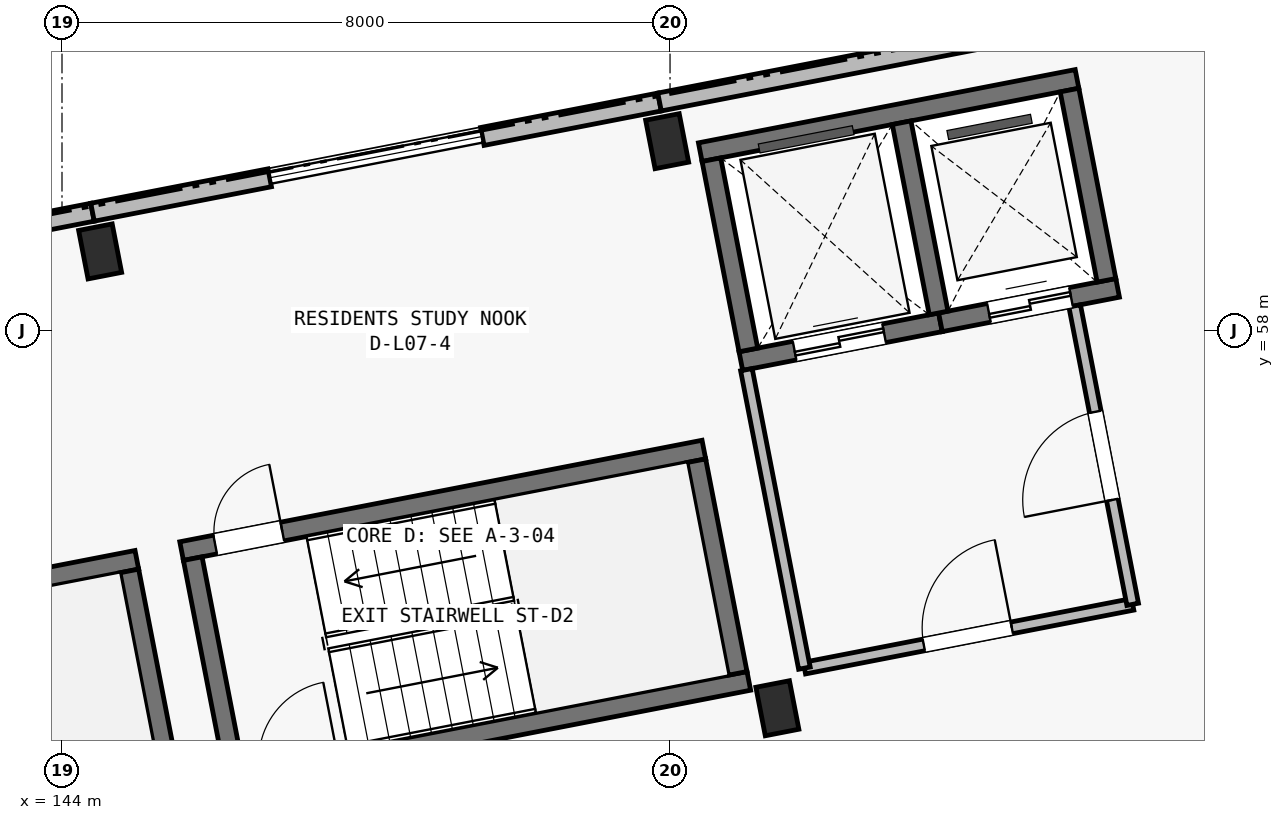
"""IFC4 building model, lengths in metres.
Left out: names, types, materials, properties, quantities, classifications, styles, units other than length and angle.
Written with IfcOpenShell. Run it as: python <this file> out.ifc"""

import sys

from ifc_helpers import new_model, si_unit, direction, frame, frame_2d, origin, origin_2d, place, context, subcontext, project, spatial, rectangle, extrude, element, fill, save


model = new_model("IFC4")
c1 = context("Model", 3, precision=1e-05, world=origin(), true_north=direction((0.0, 1.0)))
c2 = subcontext(c1, "Body", "Model", "MODEL_VIEW")
j1 = project(units=[si_unit("LENGTHUNIT", "METRE"), si_unit("PLANEANGLEUNIT", "RADIAN")], contexts=[c1])
p1 = place(None, origin())
s1 = spatial("IfcSite", under=j1, at=p1, CompositionType="ELEMENT")
p2 = place(p1, origin())
s2 = spatial("IfcBuilding", under=s1, at=p2, CompositionType="ELEMENT")
p3 = place(p2, frame((0.0, 0.0, 24.65)))
s3 = spatial("IfcBuildingStorey", under=s2, at=p3, CompositionType="ELEMENT", Elevation=24.65)
for number, where, z_axis, x_axis in (
    (1, (144.502, 59.041, 0.0), (0.0, 0.0, 1.0), (0.982, 0.191, 0.0)),
    (2, (153.412, 53.03, 0.0), (0.0, 0.0, 1.0), (0.982, 0.191, 0.0)),
    (3, (151.962, 60.491, 0.0), (0.0, 0.0, 1.0), (0.982, 0.191, 0.0)),
):
    element("IfcColumn", number, at=place(p3, frame(where, z_axis=z_axis, x_axis=x_axis)), inside=s3, PredefinedType="COLUMN", context=c2, shape_type="SweptSolid", body=[
        extrude(rectangle(XDim=0.45, YDim=0.65, at=origin_2d()), origin(), (0.0, 0.0, 1.0), 3.25),
    ])
p4 = place(p3, frame((152.397, 60.346, 0.0), z_axis=(0.0, 0.0, 1.0), x_axis=(0.981635261308, 0.190767433692, 0.0)))
e4 = element("IfcWall", 4, at=p4, inside=s3, PredefinedType="SHEAR", context=c2, shape_type="SweptSolid", body=[
    extrude(rectangle(XDim=5.05, YDim=0.25, at=frame_2d((2.525, 0.0))), origin(), (0.0, 0.0, 1.0), 3.25),
])
p5 = place(p3, frame((152.932, 57.598, 0.0), z_axis=(0.0, 0.0, 1.0), x_axis=(0.981636759622, 0.190759723627, 0.0)))
e5 = element("IfcWall", 5, at=p5, inside=s3, PredefinedType="SHEAR", context=c2, shape_type="SweptSolid", body=[
    extrude(rectangle(XDim=2.675, YDim=0.25, at=frame_2d((1.337, 0.0))), origin(), (0.0, 0.0, 1.0), 3.25),
])
p6 = place(p5, frame((0.72, 0.0, 0.0)))
e6 = element("IfcOpeningElement", 6, at=p6, cuts=e5, PredefinedType="OPENING", context=c2, shape_type="SweptSolid", body=[
    extrude(rectangle(XDim=1.2, YDim=2.2, at=frame_2d((0.6, 1.1))), frame((0.0, 0.14, 0.0), z_axis=(0.0, -1.0, 0.0), x_axis=(1.0, 0.0, 0.0)), (0.0, 0.0, 1.0), 0.28),
])
p7 = place(p3, frame((155.558, 58.108, 0.0), z_axis=(0.0, 0.0, 1.0), x_axis=(0.981633573872, 0.190776116556, 0.0)))
e7 = element("IfcWall", 7, at=p7, inside=s3, PredefinedType="SHEAR", context=c2, shape_type="SweptSolid", body=[
    extrude(rectangle(XDim=2.375, YDim=0.25, at=frame_2d((1.188, 0.0))), origin(), (0.0, 0.0, 1.0), 3.25),
])
p8 = place(p7, frame((0.65, 0.0, 0.0)))
e8 = element("IfcOpeningElement", 8, at=p8, cuts=e7, PredefinedType="OPENING", context=c2, shape_type="SweptSolid", body=[
    extrude(rectangle(XDim=1.1, YDim=2.15, at=frame_2d((0.55, 1.075))), frame((0.0, 0.14, 0.0), z_axis=(0.0, -1.0, 0.0), x_axis=(1.0, 0.0, 0.0)), (0.0, 0.0, 1.0), 0.28),
])
for number, where, z_axis, x_axis in (
    (9, (153.031, 57.744, 0.0), (0.0, 0.0, 1.0), (-0.191, 0.982, 0.0)),
    (10, (155.534, 58.231, 0.0), (0.0, 0.0, 1.0), (-0.191, 0.982, 0.0)),
    (11, (157.742, 58.66, 0.0), (0.0, 0.0, 1.0), (-0.191, 0.982, 0.0)),
):
    element("IfcWall", number, at=place(p3, frame(where, z_axis=z_axis, x_axis=x_axis)), inside=s3, PredefinedType="SHEAR", context=c2, shape_type="SweptSolid", body=[
        extrude(rectangle(XDim=2.55, YDim=0.25, at=frame_2d((1.275, 0.0))), origin(), (0.0, 0.0, 1.0), 3.25),
    ])
p9 = place(p3, frame((138.113, 53.647, 0.0), z_axis=(0.0, 0.0, 1.0), x_axis=(0.981626097708, 0.19081458094, 0.0)))
e12 = element("IfcWall", 12, at=p9, inside=s3, PredefinedType="SHEAR", context=c2, shape_type="SweptSolid", body=[
    extrude(rectangle(XDim=7.0, YDim=0.25, at=frame_2d((3.5, 0.0))), origin(), (0.0, 0.0, 1.0), 3.25),
])
p10 = place(p9, frame((0.45, 0.0, 0.0)))
e13 = element("IfcOpeningElement", 13, at=p10, cuts=e12, PredefinedType="OPENING", context=c2, shape_type="SweptSolid", body=[
    extrude(rectangle(XDim=0.9, YDim=2.1, at=frame_2d((0.45, 1.05))), frame((0.0, 0.14, 0.0), z_axis=(0.0, -1.0, 0.0), x_axis=(1.0, 0.0, 0.0)), (0.0, 0.0, 1.0), 0.28),
])
p11 = place(p3, frame((145.43, 52.039, 0.0), z_axis=(0.0, 0.0, 1.0), x_axis=(-0.190842147128, 0.981620738819, 0.0)))
e14 = element("IfcWall", 14, at=p11, inside=s3, PredefinedType="SHEAR", context=c2, shape_type="SweptSolid", body=[
    extrude(rectangle(XDim=2.85, YDim=0.25, at=frame_2d((1.425, 0.0))), origin(), (0.0, 0.0, 1.0), 3.25),
])
p12 = place(p3, frame((145.574, 55.098, 0.0), z_axis=(0.0, 0.0, 1.0), x_axis=(0.981626097708, 0.19081458094, 0.0)))
e15 = element("IfcWall", 15, at=p12, inside=s3, PredefinedType="SHEAR", context=c2, shape_type="SweptSolid", body=[
    extrude(rectangle(XDim=7.0, YDim=0.25, at=frame_2d((3.5, 0.0))), origin(), (0.0, 0.0, 1.0), 3.25),
])
p13 = place(p12, frame((0.45, 0.0, 0.0)))
e16 = element("IfcOpeningElement", 16, at=p13, cuts=e15, PredefinedType="OPENING", context=c2, shape_type="SweptSolid", body=[
    extrude(rectangle(XDim=0.9, YDim=2.1, at=frame_2d((0.45, 1.05))), frame((0.0, 0.14, 0.0), z_axis=(0.0, -1.0, 0.0), x_axis=(1.0, 0.0, 0.0)), (0.0, 0.0, 1.0), 0.28),
])
p14 = place(p3, frame((146.165, 52.054, 0.0), z_axis=(0.0, 0.0, 1.0), x_axis=(0.981627367538, 0.190808048312, 0.0)))
e17 = element("IfcWall", 17, at=p14, inside=s3, PredefinedType="SHEAR", context=c2, shape_type="SweptSolid", body=[
    extrude(rectangle(XDim=7.0, YDim=0.25, at=frame_2d((3.5, 0.0))), origin(), (0.0, 0.0, 1.0), 3.25),
])
p15 = place(p14, frame((0.45, 0.0, 0.0)))
e18 = element("IfcOpeningElement", 18, at=p15, cuts=e17, PredefinedType="OPENING", context=c2, shape_type="SweptSolid", body=[
    extrude(rectangle(XDim=1.05, YDim=2.15, at=frame_2d((0.525, 1.075))), frame((0.0, 0.14, 0.0), z_axis=(0.0, -1.0, 0.0), x_axis=(1.0, 0.0, 0.0)), (0.0, 0.0, 1.0), 0.28),
])
for number, where, z_axis, x_axis in (
    (19, (146.264, 52.201, 0.0), (0.0, 0.0, 1.0), (-0.191, 0.982, 0.0)),
    (20, (152.89, 53.489, 0.0), (0.0, 0.0, 1.0), (-0.191, 0.982, 0.0)),
):
    element("IfcWall", number, at=place(p3, frame(where, z_axis=z_axis, x_axis=x_axis)), inside=s3, PredefinedType="SHEAR", context=c2, shape_type="SweptSolid", body=[
        extrude(rectangle(XDim=2.85, YDim=0.25, at=frame_2d((1.425, 0.0))), origin(), (0.0, 0.0, 1.0), 3.25),
    ])
p16 = place(p3, frame((142.07, 59.103, 0.0), z_axis=(0.0, 0.0, 1.0), x_axis=(0.981629832251, 0.190795367961, 0.0)))
e21 = element("IfcWall", 21, at=p16, inside=s3, PredefinedType="SOLIDWALL", context=c2, shape_type="SweptSolid", body=[
    extrude(rectangle(XDim=2.375, YDim=0.24, at=frame_2d((1.188, 0.0))), origin(), (0.0, 0.0, 1.0), 3.0),
])
p17 = place(p3, frame((144.401, 59.556, 0.0), z_axis=(0.0, 0.0, 1.0), x_axis=(0.981633573872, 0.190776116556, 0.0)))
e22 = element("IfcWall", 22, at=p17, inside=s3, PredefinedType="SOLIDWALL", context=c2, shape_type="SweptSolid", body=[
    extrude(rectangle(XDim=2.375, YDim=0.24, at=frame_2d((1.188, 0.0))), origin(), (0.0, 0.0, 1.0), 3.0),
])
p18 = place(p3, frame((149.531, 60.553, 0.0), z_axis=(0.0, 0.0, 1.0), x_axis=(0.98161057432, 0.190894422087, 0.0)))
e23 = element("IfcWall", 23, at=p18, inside=s3, PredefinedType="SOLIDWALL", context=c2, shape_type="SweptSolid", body=[
    extrude(rectangle(XDim=2.375, YDim=0.24, at=frame_2d((1.188, 0.0))), origin(), (0.0, 0.0, 1.0), 3.0),
])
p19 = place(p3, frame((151.862, 61.006, 0.0), z_axis=(0.0, 0.0, 1.0), x_axis=(0.981627273155, 0.190808533872, 0.0)))
e24 = element("IfcWall", 24, at=p19, inside=s3, PredefinedType="SOLIDWALL", context=c2, shape_type="SweptSolid", body=[
    extrude(rectangle(XDim=8.125, YDim=0.24, at=frame_2d((4.062, 0.0))), origin(), (0.0, 0.0, 1.0), 3.0),
])
p20 = place(p3, frame((153.768, 53.558, 0.0), z_axis=(0.0, 0.0, 1.0), x_axis=(0.981624918225, 0.190820648566, 0.0)))
e25 = element("IfcWall", 25, at=p20, inside=s3, PredefinedType="PARTITIONING", context=c2, shape_type="SweptSolid", body=[
    extrude(rectangle(XDim=4.4, YDim=0.155, at=frame_2d((2.2, 0.0))), origin(), (0.0, 0.0, 1.0), 2.97),
])
p21 = place(p20, frame((1.6, 0.0, 0.0)))
e26 = element("IfcOpeningElement", 26, at=p21, cuts=e25, PredefinedType="OPENING", context=c2, shape_type="SweptSolid", body=[
    extrude(rectangle(XDim=1.18, YDim=2.15, at=frame_2d((0.59, 1.075))), frame((0.0, 0.093, 0.0), z_axis=(0.0, -1.0, 0.0), x_axis=(1.0, 0.0, 0.0)), (0.0, 0.0, 1.0), 0.185),
])
p22 = place(p3, frame((153.768, 53.558, 0.0), z_axis=(0.0, 0.0, 1.0), x_axis=(-0.19085495634, 0.981618248425, 0.0)))
e27 = element("IfcWall", 27, at=p22, inside=s3, PredefinedType="PARTITIONING", context=c2, shape_type="SweptSolid", body=[
    extrude(rectangle(XDim=4.0, YDim=0.155, at=frame_2d((2.0, 0.0))), origin(), (0.0, 0.0, 1.0), 2.97),
])
p23 = place(p3, frame((158.087, 54.397, 0.0), z_axis=(0.0, 0.0, 1.0), x_axis=(-0.190796144009, 0.981629681413, 0.0)))
e28 = element("IfcWall", 28, at=p23, inside=s3, PredefinedType="PARTITIONING", context=c2, shape_type="SweptSolid", body=[
    extrude(rectangle(XDim=4.0, YDim=0.155, at=frame_2d((2.0, 0.0))), origin(), (0.0, 0.0, 1.0), 2.97),
])
p24 = place(p23, frame((1.4, 0.0, 0.0)))
e29 = element("IfcOpeningElement", 29, at=p24, cuts=e28, PredefinedType="OPENING", context=c2, shape_type="SweptSolid", body=[
    extrude(rectangle(XDim=1.18, YDim=2.15, at=frame_2d((0.59, 1.075))), frame((0.0, 0.093, 0.0), z_axis=(0.0, -1.0, 0.0), x_axis=(1.0, 0.0, 0.0)), (0.0, 0.0, 1.0), 0.185),
])
p25 = place(p21, origin())
e30 = element("IfcDoor", 30, at=p25, inside=s3, OperationType="SINGLE_SWING_RIGHT", PredefinedType="DOOR", context=c2, shape_type="SweptSolid", body=[
    extrude(rectangle(XDim=1.18, YDim=2.15, at=frame_2d((0.59, 1.075))), frame((0.0, 0.025, 0.0), z_axis=(0.0, -1.0, 0.0), x_axis=(1.0, 0.0, 0.0)), (0.0, 0.0, 1.0), 0.05),
])
fill(e26, e30)
p26 = place(p24, origin())
e31 = element("IfcDoor", 31, at=p26, inside=s3, OperationType="SINGLE_SWING_LEFT", PredefinedType="DOOR", context=c2, shape_type="SweptSolid", body=[
    extrude(rectangle(XDim=1.18, YDim=2.15, at=frame_2d((0.59, 1.075))), frame((0.0, 0.025, 0.0), z_axis=(0.0, -1.0, 0.0), x_axis=(1.0, 0.0, 0.0)), (0.0, 0.0, 1.0), 0.05),
])
fill(e29, e31)
p27 = place(p13, origin())
e32 = element("IfcDoor", 32, at=p27, inside=s3, OperationType="SINGLE_SWING_RIGHT", PredefinedType="DOOR", context=c2, shape_type="SweptSolid", body=[
    extrude(rectangle(XDim=0.9, YDim=2.1, at=frame_2d((0.45, 1.05))), frame((0.0, 0.025, 0.0), z_axis=(0.0, -1.0, 0.0), x_axis=(1.0, 0.0, 0.0)), (0.0, 0.0, 1.0), 0.05),
])
fill(e16, e32)
p28 = place(p6, origin())
e33 = element("IfcDoor", 33, at=p28, inside=s3, OperationType="DOUBLE_DOOR_SLIDING", PredefinedType="DOOR", context=c2, shape_type="SweptSolid", body=[
    extrude(rectangle(XDim=1.2, YDim=2.2, at=frame_2d((0.6, 1.1))), frame((0.0, 0.025, 0.0), z_axis=(0.0, -1.0, 0.0), x_axis=(1.0, 0.0, 0.0)), (0.0, 0.0, 1.0), 0.05),
])
fill(e6, e33)
p29 = place(p8, origin())
e34 = element("IfcDoor", 34, at=p29, inside=s3, OperationType="DOUBLE_DOOR_SLIDING", PredefinedType="DOOR", context=c2, shape_type="SweptSolid", body=[
    extrude(rectangle(XDim=1.1, YDim=2.15, at=frame_2d((0.55, 1.075))), frame((0.0, 0.025, 0.0), z_axis=(0.0, -1.0, 0.0), x_axis=(1.0, 0.0, 0.0)), (0.0, 0.0, 1.0), 0.05),
])
fill(e8, e34)
save(model, sys.argv[1])
